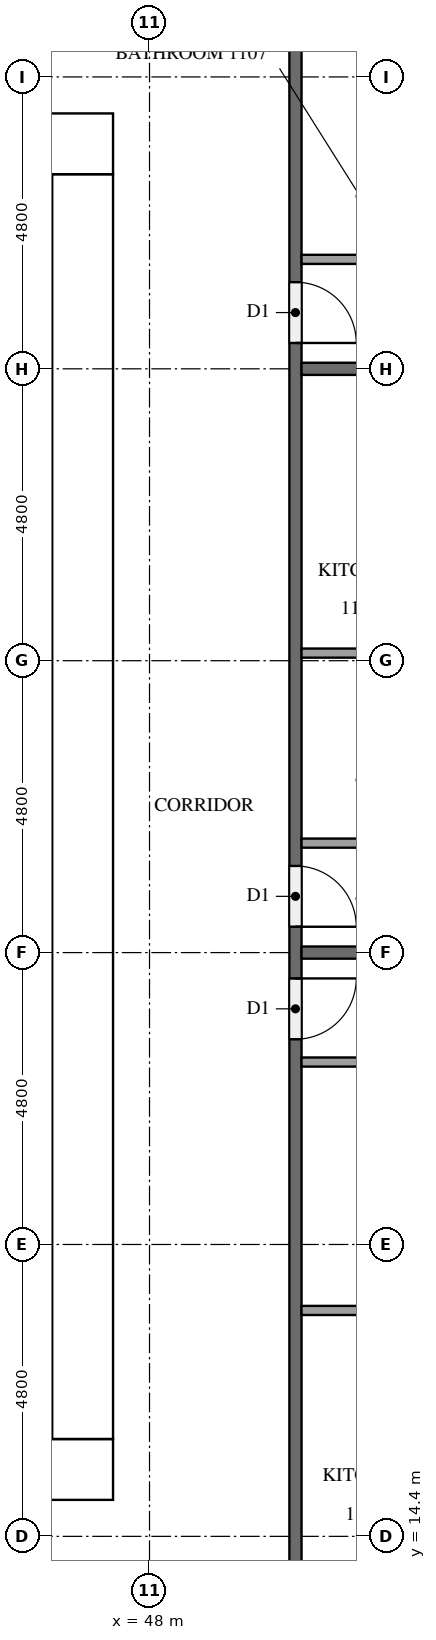
"""IFC4 building model, lengths in metres.
Left out: names, types, materials, properties, quantities, classifications, styles, units other than length and angle.
Written with IfcOpenShell. Run it as: python <this file> out.ifc"""

import sys

from ifc_helpers import new_model, si_unit, direction, frame, frame_2d, origin, place, context, subcontext, project, spatial, rectangle, extrude, element, fill, save


model = new_model("IFC4")
c1 = context("Model", 3, precision=1e-05, world=origin(), true_north=direction((0.0, 1.0)))
c2 = subcontext(c1, "Body", "Model", "MODEL_VIEW")
j1 = project(units=[si_unit("LENGTHUNIT", "METRE"), si_unit("PLANEANGLEUNIT", "RADIAN")], contexts=[c1])
p1 = place(None, origin())
s1 = spatial("IfcSite", under=j1, at=p1, CompositionType="ELEMENT")
p2 = place(p1, origin())
s2 = spatial("IfcBuilding", under=s1, at=p2, CompositionType="ELEMENT")
p3 = place(p2, frame((0.0, 0.0, 46.9)))
s3 = spatial("IfcBuildingStorey", under=s2, at=p3, CompositionType="ELEMENT", Elevation=46.9)
p4 = place(p3, frame((15.0, 15.5, 0.0), z_axis=(0.0, 0.0, 1.0), x_axis=(1.0, 0.0, 0.0)))
e1 = element("IfcWall", 1, at=p4, inside=s3, PredefinedType="SHEAR", context=c2, shape_type="SweptSolid", body=[
    extrude(rectangle(XDim=32.4, YDim=1.0, at=frame_2d((16.2, 0.0))), origin(), (0.0, 0.0, 1.0), 3.2),
])
p5 = place(p4, frame((15.3, 0.0, 0.0)))
e2 = element("IfcOpeningElement", 2, at=p5, cuts=e1, PredefinedType="OPENING", context=c2, shape_type="SweptSolid", body=[
    extrude(rectangle(XDim=1.8, YDim=2.1, at=frame_2d((0.9, 1.05))), frame((0.0, 0.51, 0.0), z_axis=(0.0, -1.0, 0.0), x_axis=(1.0, 0.0, 0.0)), (0.0, 0.0, 1.0), 1.02),
])
p6 = place(p3, frame((15.0, 37.3, 0.0), z_axis=(0.0, 0.0, 1.0), x_axis=(1.0, 0.0, 0.0)))
e3 = element("IfcWall", 3, at=p6, inside=s3, PredefinedType="SHEAR", context=c2, shape_type="SweptSolid", body=[
    extrude(rectangle(XDim=32.4, YDim=1.0, at=frame_2d((16.2, 0.0))), origin(), (0.0, 0.0, 1.0), 3.2),
])
p7 = place(p6, frame((15.3, 0.0, 0.0)))
e4 = element("IfcOpeningElement", 4, at=p7, cuts=e3, PredefinedType="OPENING", context=c2, shape_type="SweptSolid", body=[
    extrude(rectangle(XDim=1.8, YDim=2.1, at=frame_2d((0.9, 1.05))), frame((0.0, 0.51, 0.0), z_axis=(0.0, -1.0, 0.0), x_axis=(1.0, 0.0, 0.0)), (0.0, 0.0, 1.0), 1.02),
])
p8 = place(p6, frame((1.766, 0.0, 0.0)))
e5 = element("IfcOpeningElement", 5, at=p8, cuts=e3, PredefinedType="OPENING", context=c2, shape_type="SweptSolid", body=[
    extrude(rectangle(XDim=1.0, YDim=2.1, at=frame_2d((0.5, 1.05))), frame((0.0, 0.51, 0.0), z_axis=(0.0, -1.0, 0.0), x_axis=(1.0, 0.0, 0.0)), (0.0, 0.0, 1.0), 1.02),
])
p9 = place(p6, frame((5.241, 0.0, 0.0)))
e6 = element("IfcOpeningElement", 6, at=p9, cuts=e3, PredefinedType="OPENING", context=c2, shape_type="SweptSolid", body=[
    extrude(rectangle(XDim=1.0, YDim=2.1, at=frame_2d((0.5, 1.05))), frame((0.0, 0.51, 0.0), z_axis=(0.0, -1.0, 0.0), x_axis=(1.0, 0.0, 0.0)), (0.0, 0.0, 1.0), 1.02),
])
p10 = place(p3, frame((46.9, 16.0, 0.0), z_axis=(0.0, 0.0, 1.0), x_axis=(0.0, 1.0, 0.0)))
e7 = element("IfcWall", 7, at=p10, inside=s3, PredefinedType="SHEAR", context=c2, shape_type="SweptSolid", body=[
    extrude(rectangle(XDim=20.8, YDim=1.0, at=frame_2d((10.4, 0.0))), origin(), (0.0, 0.0, 1.0), 3.2),
])
p11 = place(p10, frame((10.1, 0.0, 0.0)))
e8 = element("IfcOpeningElement", 8, at=p11, cuts=e7, PredefinedType="OPENING", context=c2, shape_type="SweptSolid", body=[
    extrude(rectangle(XDim=1.2, YDim=2.1, at=frame_2d((0.6, 1.05))), frame((0.0, 0.51, 0.0), z_axis=(0.0, -1.0, 0.0), x_axis=(1.0, 0.0, 0.0)), (0.0, 0.0, 1.0), 1.02),
])
p12 = place(p3, frame((50.4, 40.7, 0.0), z_axis=(0.0, 0.0, 1.0), x_axis=(0.0, -1.0, 0.0)))
e9 = element("IfcWall", 9, at=p12, inside=s3, PredefinedType="PARTITIONING", context=c2, shape_type="SweptSolid", body=[
    extrude(rectangle(XDim=28.6, YDim=0.2, at=frame_2d((14.3, 0.0))), origin(), (0.0, 0.0, 1.0), 3.2),
])
p13 = place(p12, frame((17.125, 0.0, 0.0)))
e10 = element("IfcOpeningElement", 10, at=p13, cuts=e9, PredefinedType="OPENING", context=c2, shape_type="SweptSolid", body=[
    extrude(rectangle(XDim=1.0, YDim=2.1, at=frame_2d((0.5, 1.05))), frame((0.0, 0.11, 0.0), z_axis=(0.0, -1.0, 0.0), x_axis=(1.0, 0.0, 0.0)), (0.0, 0.0, 1.0), 0.22),
])
p14 = place(p12, frame((15.275, 0.0, 0.0)))
e11 = element("IfcOpeningElement", 11, at=p14, cuts=e9, PredefinedType="OPENING", context=c2, shape_type="SweptSolid", body=[
    extrude(rectangle(XDim=1.0, YDim=2.1, at=frame_2d((0.5, 1.05))), frame((0.0, 0.11, 0.0), z_axis=(0.0, -1.0, 0.0), x_axis=(1.0, 0.0, 0.0)), (0.0, 0.0, 1.0), 0.22),
])
p15 = place(p12, frame((5.675, 0.0, 0.0)))
e12 = element("IfcOpeningElement", 12, at=p15, cuts=e9, PredefinedType="OPENING", context=c2, shape_type="SweptSolid", body=[
    extrude(rectangle(XDim=1.0, YDim=2.1, at=frame_2d((0.5, 1.05))), frame((0.0, 0.11, 0.0), z_axis=(0.0, -1.0, 0.0), x_axis=(1.0, 0.0, 0.0)), (0.0, 0.0, 1.0), 0.22),
])
for number, where, z_axis, x_axis in (
    (13, (50.5, 24.0, 0.0), (0.0, 0.0, 1.0), (1.0, 0.0, 0.0)),
    (14, (50.5, 33.6, 0.0), (0.0, 0.0, 1.0), (1.0, 0.0, 0.0)),
):
    element("IfcWall", number, at=place(p3, frame(where, z_axis=z_axis, x_axis=x_axis)), inside=s3, PredefinedType="PARTITIONING", context=c2, shape_type="SweptSolid", body=[
        extrude(rectangle(XDim=6.65, YDim=0.2, at=frame_2d((3.325, 0.0))), origin(), (0.0, 0.0, 1.0), 3.2),
    ])
p16 = place(p3, frame((50.5, 18.115, 0.0), z_axis=(0.0, 0.0, 1.0), x_axis=(1.0, 0.0, 0.0)))
e15 = element("IfcWall", 15, at=p16, inside=s3, PredefinedType="PARTITIONING", context=c2, shape_type="SweptSolid", body=[
    extrude(rectangle(XDim=2.075, YDim=0.15, at=frame_2d((1.038, 0.0))), origin(), (0.0, 0.0, 1.0), 3.2),
])
p17 = place(p3, frame((50.5, 22.2, 0.0), z_axis=(0.0, 0.0, 1.0), x_axis=(1.0, 0.0, 0.0)))
e16 = element("IfcWall", 16, at=p17, inside=s3, PredefinedType="PARTITIONING", context=c2, shape_type="SweptSolid", body=[
    extrude(rectangle(XDim=2.225, YDim=0.15, at=frame_2d((1.113, 0.0))), origin(), (0.0, 0.0, 1.0), 3.2),
])
p18 = place(p3, frame((50.5, 28.925, 0.0), z_axis=(0.0, 0.0, 1.0), x_axis=(1.0, 0.0, 0.0)))
e17 = element("IfcWall", 17, at=p18, inside=s3, PredefinedType="PARTITIONING", context=c2, shape_type="SweptSolid", body=[
    extrude(rectangle(XDim=1.925, YDim=0.15, at=frame_2d((0.962, 0.0))), origin(), (0.0, 0.0, 1.0), 3.2),
])
for number, where, z_axis, x_axis in (
    (18, (50.5, 25.8, 0.0), (0.0, 0.0, 1.0), (1.0, 0.0, 0.0)),
    (19, (50.5, 35.4, 0.0), (0.0, 0.0, 1.0), (1.0, 0.0, 0.0)),
):
    element("IfcWall", number, at=place(p3, frame(where, z_axis=z_axis, x_axis=x_axis)), inside=s3, PredefinedType="PARTITIONING", context=c2, shape_type="SweptSolid", body=[
        extrude(rectangle(XDim=2.075, YDim=0.15, at=frame_2d((1.038, 0.0))), origin(), (0.0, 0.0, 1.0), 3.2),
    ])
p19 = place(p11, origin())
e20 = element("IfcDoor", 20, at=p19, inside=s3, OperationType="SINGLE_SWING_LEFT", PredefinedType="DOOR", context=c2, shape_type="SweptSolid", body=[
    extrude(rectangle(XDim=1.2, YDim=2.1, at=frame_2d((0.6, 1.05))), frame((0.0, 0.025, 0.0), z_axis=(0.0, -1.0, 0.0), x_axis=(1.0, 0.0, 0.0)), (0.0, 0.0, 1.0), 0.05),
])
fill(e8, e20)
p20 = place(p13, origin())
e21 = element("IfcDoor", 21, at=p20, inside=s3, OperationType="SINGLE_SWING_LEFT", PredefinedType="DOOR", context=c2, shape_type="SweptSolid", body=[
    extrude(rectangle(XDim=1.0, YDim=2.1, at=frame_2d((0.5, 1.05))), frame((0.0, 0.025, 0.0), z_axis=(0.0, -1.0, 0.0), x_axis=(1.0, 0.0, 0.0)), (0.0, 0.0, 1.0), 0.05),
])
fill(e10, e21)
p21 = place(p14, origin())
e22 = element("IfcDoor", 22, at=p21, inside=s3, OperationType="SINGLE_SWING_RIGHT", PredefinedType="DOOR", context=c2, shape_type="SweptSolid", body=[
    extrude(rectangle(XDim=1.0, YDim=2.1, at=frame_2d((0.5, 1.05))), frame((0.0, 0.025, 0.0), z_axis=(0.0, -1.0, 0.0), x_axis=(1.0, 0.0, 0.0)), (0.0, 0.0, 1.0), 0.05),
])
fill(e11, e22)
p22 = place(p15, origin())
e23 = element("IfcDoor", 23, at=p22, inside=s3, OperationType="SINGLE_SWING_RIGHT", PredefinedType="DOOR", context=c2, shape_type="SweptSolid", body=[
    extrude(rectangle(XDim=1.0, YDim=2.1, at=frame_2d((0.5, 1.05))), frame((0.0, 0.025, 0.0), z_axis=(0.0, -1.0, 0.0), x_axis=(1.0, 0.0, 0.0)), (0.0, 0.0, 1.0), 0.05),
])
fill(e12, e23)
save(model, sys.argv[1])
